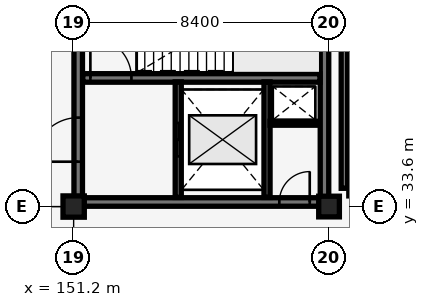
"""IFC4 building model, lengths in metres.
Left out: names, types, materials, properties, quantities, classifications, styles, units other than length and angle.
Written with IfcOpenShell. Run it as: python <this file> out.ifc"""

import sys

from ifc_helpers import new_model, si_unit, direction, frame, frame_2d, origin, origin_2d, place, context, subcontext, project, spatial, rectangle, extrude, element, fill, save


model = new_model("IFC4")
c1 = context("Model", 3, precision=1e-05, world=origin(), true_north=direction((0.0, 1.0)))
c2 = subcontext(c1, "Body", "Model", "MODEL_VIEW")
j1 = project(units=[si_unit("LENGTHUNIT", "METRE"), si_unit("PLANEANGLEUNIT", "RADIAN")], contexts=[c1])
p1 = place(None, origin())
s1 = spatial("IfcSite", under=j1, at=p1, CompositionType="ELEMENT")
p2 = place(p1, origin())
s2 = spatial("IfcBuilding", under=s1, at=p2, CompositionType="ELEMENT")
p3 = place(p2, frame((0.0, 0.0, 9.86)))
s3 = spatial("IfcBuildingStorey", under=s2, at=p3, CompositionType="ELEMENT", Elevation=9.86)
p4 = place(p3, frame((151.35, 33.75, 0.0), z_axis=(0.0, 0.0, 1.0), x_axis=(1.0, 0.0, 0.0)))
e1 = element("IfcWall", 1, at=p4, inside=s3, PredefinedType="SHEAR", context=c2, shape_type="SweptSolid", body=[
    extrude(rectangle(XDim=8.1, YDim=0.28, at=frame_2d((4.05, 0.0))), origin(), (0.0, 0.0, 1.0), 3.78),
])
p5 = place(p4, frame((6.615, 0.0, 0.0)))
e2 = element("IfcOpeningElement", 2, at=p5, cuts=e1, PredefinedType="OPENING", context=c2, shape_type="SweptSolid", body=[
    extrude(rectangle(XDim=1.0, YDim=2.15, at=frame_2d((0.5, 1.075))), frame((0.0, 0.15, 0.0), z_axis=(0.0, -1.0, 0.0), x_axis=(1.0, 0.0, 0.0)), (0.0, 0.0, 1.0), 0.3),
])
p6 = place(p3, frame((151.35, 33.75, 0.0), z_axis=(0.0, 0.0, 1.0), x_axis=(0.0, 1.0, 0.0)))
e3 = element("IfcWall", 3, at=p6, inside=s3, PredefinedType="SHEAR", context=c2, shape_type="SweptSolid", body=[
    extrude(rectangle(XDim=8.1, YDim=0.28, at=frame_2d((4.05, 0.0))), origin(), (0.0, 0.0, 1.0), 3.78),
])
p7 = place(p6, frame((1.325, 0.0, 0.0)))
e4 = element("IfcOpeningElement", 4, at=p7, cuts=e3, PredefinedType="OPENING", context=c2, shape_type="SweptSolid", body=[
    extrude(rectangle(XDim=1.45, YDim=2.15, at=frame_2d((0.725, 1.075))), frame((0.0, 0.15, 0.0), z_axis=(0.0, -1.0, 0.0), x_axis=(1.0, 0.0, 0.0)), (0.0, 0.0, 1.0), 0.3),
])
p8 = place(p3, frame((159.45, 33.75, 0.0), z_axis=(0.0, 0.0, 1.0), x_axis=(0.0, 1.0, 0.0)))
e5 = element("IfcWall", 5, at=p8, inside=s3, PredefinedType="SHEAR", context=c2, shape_type="SweptSolid", body=[
    extrude(rectangle(XDim=8.1, YDim=0.28, at=frame_2d((4.05, 0.0))), origin(), (0.0, 0.0, 1.0), 3.78),
])
p9 = place(p3, frame((151.5, 37.83, 0.0), z_axis=(0.0, 0.0, 1.0), x_axis=(1.0, 0.0, 0.0)))
e6 = element("IfcWall", 6, at=p9, inside=s3, PredefinedType="SHEAR", context=c2, shape_type="SweptSolid", body=[
    extrude(rectangle(XDim=7.8, YDim=0.28, at=frame_2d((3.9, 0.0))), origin(), (0.0, 0.0, 1.0), 3.78),
])
p10 = place(p9, frame((0.25, 0.0, 0.0)))
e7 = element("IfcOpeningElement", 7, at=p10, cuts=e6, PredefinedType="OPENING", context=c2, shape_type="SweptSolid", body=[
    extrude(rectangle(XDim=1.35, YDim=2.15, at=frame_2d((0.675, 1.075))), frame((0.0, 0.15, 0.0), z_axis=(0.0, -1.0, 0.0), x_axis=(1.0, 0.0, 0.0)), (0.0, 0.0, 1.0), 0.3),
])
p11 = place(p3, frame((151.2, 33.6, 0.0), z_axis=(0.0, 0.0, 1.0), x_axis=(1.0, 0.0, 0.0)))
e8 = element("IfcColumn", 8, at=p11, inside=s3, PredefinedType="COLUMN", context=c2, shape_type="SweptSolid", body=[
    extrude(rectangle(XDim=0.7, YDim=0.7, at=origin_2d()), origin(), (0.0, 0.0, 1.0), 3.78),
])
p12 = place(p3, frame((159.6, 33.6, 0.0), z_axis=(0.0, 0.0, 1.0), x_axis=(1.0, 0.0, 0.0)))
e9 = element("IfcColumn", 9, at=p12, inside=s3, PredefinedType="COLUMN", context=c2, shape_type="SweptSolid", body=[
    extrude(rectangle(XDim=0.68, YDim=0.68, at=origin_2d()), origin(), (0.0, 0.0, 1.0), 3.78),
])
p13 = place(p3, frame((154.64, 33.9, 0.0), z_axis=(0.0, 0.0, 1.0), x_axis=(0.0, 1.0, 0.0)))
e10 = element("IfcWall", 10, at=p13, inside=s3, PredefinedType="SHEAR", context=c2, shape_type="SweptSolid", body=[
    extrude(rectangle(XDim=3.8, YDim=0.2, at=frame_2d((1.9, 0.0))), origin(), (0.0, 0.0, 1.0), 2.91),
])
p14 = place(p13, frame((1.35, 0.0, 0.0)))
e11 = element("IfcOpeningElement", 11, at=p14, cuts=e10, PredefinedType="OPENING", context=c2, shape_type="SweptSolid", body=[
    extrude(rectangle(XDim=1.1, YDim=2.15, at=frame_2d((0.55, 1.075))), frame((0.0, 0.11, 0.0), z_axis=(0.0, -1.0, 0.0), x_axis=(1.0, 0.0, 0.0)), (0.0, 0.0, 1.0), 0.22),
])
p15 = place(p3, frame((157.56, 33.9, 0.0), z_axis=(0.0, 0.0, 1.0), x_axis=(0.0, 1.0, 0.0)))
e12 = element("IfcWall", 12, at=p15, inside=s3, PredefinedType="SHEAR", context=c2, shape_type="SweptSolid", body=[
    extrude(rectangle(XDim=3.8, YDim=0.2, at=frame_2d((1.9, 0.0))), origin(), (0.0, 0.0, 1.0), 2.91),
])
p16 = place(p3, frame((157.66, 36.34, 0.0), z_axis=(0.0, 0.0, 1.0), x_axis=(1.0, 0.0, 0.0)))
e13 = element("IfcWall", 13, at=p16, inside=s3, PredefinedType="PARTITIONING", context=c2, shape_type="SweptSolid", body=[
    extrude(rectangle(XDim=1.62, YDim=0.13, at=frame_2d((0.81, 0.0))), origin(), (0.0, 0.0, 1.0), 3.78),
])
p17 = place(p3, frame((160.25, 34.05, 0.0), z_axis=(0.0, 0.0, 1.0), x_axis=(1.0, 0.0, 0.0)))
e14 = element("IfcWall", 14, at=p17, inside=s3, PredefinedType="PARTITIONING", context=c2, shape_type="SweptSolid", body=[
    extrude(rectangle(XDim=7.57, YDim=0.2, at=frame_2d((3.785, 0.0))), origin(), (0.0, 0.0, 1.0), 3.0),
])
p18 = place(p17, frame((3.035, 0.0, 0.0)))
e15 = element("IfcOpeningElement", 15, at=p18, cuts=e14, PredefinedType="OPENING", context=c2, shape_type="SweptSolid", body=[
    extrude(rectangle(XDim=1.5, YDim=2.2, at=frame_2d((0.75, 1.1))), frame((0.0, 0.11, 0.0), z_axis=(0.0, -1.0, 0.0), x_axis=(1.0, 0.0, 0.0)), (0.0, 0.0, 1.0), 0.22),
])
p19 = place(p3, frame((160.1, 34.2, 0.0), z_axis=(0.0, 0.0, 1.0), x_axis=(0.0, 1.0, 0.0)))
e16 = element("IfcWall", 16, at=p19, inside=s3, PredefinedType="PARTITIONING", context=c2, shape_type="SweptSolid", body=[
    extrude(rectangle(XDim=40.8, YDim=0.2, at=frame_2d((20.4, 0.0))), origin(), (0.0, 0.0, 1.0), 2.91),
])
p20 = place(p10, origin())
e17 = element("IfcDoor", 17, at=p20, inside=s3, OperationType="SINGLE_SWING_LEFT", PredefinedType="DOOR", context=c2, shape_type="SweptSolid", body=[
    extrude(rectangle(XDim=1.35, YDim=2.15, at=frame_2d((0.675, 1.075))), frame((0.0, 0.025, 0.0), z_axis=(0.0, -1.0, 0.0), x_axis=(1.0, 0.0, 0.0)), (0.0, 0.0, 1.0), 0.05),
])
fill(e7, e17)
p21 = place(p14, origin())
e18 = element("IfcDoor", 18, at=p21, inside=s3, OperationType="SLIDING_TO_LEFT", PredefinedType="DOOR", context=c2, shape_type="SweptSolid", body=[
    extrude(rectangle(XDim=1.1, YDim=2.15, at=frame_2d((0.55, 1.075))), frame((0.0, 0.025, 0.0), z_axis=(0.0, -1.0, 0.0), x_axis=(1.0, 0.0, 0.0)), (0.0, 0.0, 1.0), 0.05),
])
fill(e11, e18)
p22 = place(p7, origin())
e19 = element("IfcDoor", 19, at=p22, inside=s3, OperationType="DOUBLE_DOOR_SINGLE_SWING", PredefinedType="DOOR", context=c2, shape_type="SweptSolid", body=[
    extrude(rectangle(XDim=1.45, YDim=2.15, at=frame_2d((0.725, 1.075))), frame((0.0, 0.025, 0.0), z_axis=(0.0, -1.0, 0.0), x_axis=(1.0, 0.0, 0.0)), (0.0, 0.0, 1.0), 0.05),
])
fill(e4, e19)
p23 = place(p5, origin())
e20 = element("IfcDoor", 20, at=p23, inside=s3, OperationType="SINGLE_SWING_RIGHT", PredefinedType="DOOR", context=c2, shape_type="SweptSolid", body=[
    extrude(rectangle(XDim=1.0, YDim=2.15, at=frame_2d((0.5, 1.075))), frame((0.0, 0.025, 0.0), z_axis=(0.0, -1.0, 0.0), x_axis=(1.0, 0.0, 0.0)), (0.0, 0.0, 1.0), 0.05),
])
fill(e2, e20)
save(model, sys.argv[1])
